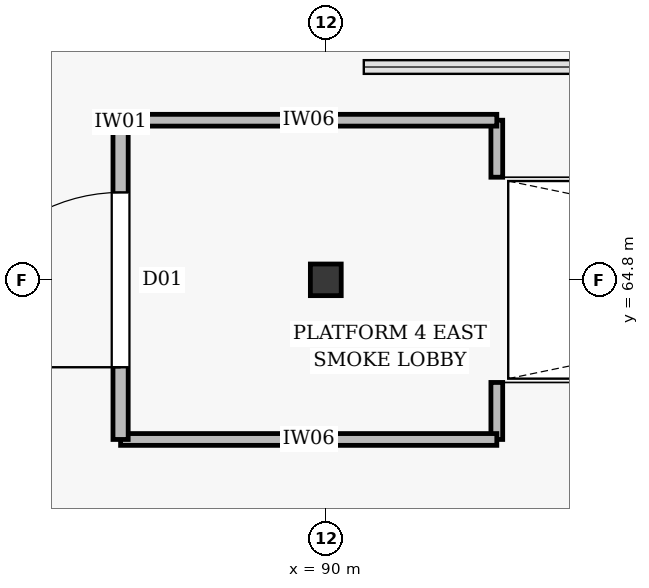
"""IFC4 building model, lengths in metres.
Left out: names, types, materials, properties, quantities, classifications, styles, units other than length and angle.
Written with IfcOpenShell. Run it as: python <this file> out.ifc"""

import sys

from ifc_helpers import new_model, si_unit, direction, frame, frame_2d, origin, origin_2d, place, context, subcontext, project, spatial, rectangle, i_section, extrude, element, fill, save


model = new_model("IFC4")
c1 = context("Model", 3, precision=1e-05, world=origin(), true_north=direction((0.0, 1.0)))
c2 = subcontext(c1, "Body", "Model", "MODEL_VIEW")
j1 = project(units=[si_unit("LENGTHUNIT", "METRE"), si_unit("PLANEANGLEUNIT", "RADIAN")], contexts=[c1])
p1 = place(None, origin())
s1 = spatial("IfcSite", under=j1, at=p1, CompositionType="ELEMENT")
p2 = place(p1, origin())
s2 = spatial("IfcBuilding", under=s1, at=p2, CompositionType="ELEMENT")
p3 = place(p2, frame((0.0, 0.0, 6.6)))
s3 = spatial("IfcBuildingStorey", under=s2, at=p3, CompositionType="ELEMENT", Elevation=6.6)
p4 = place(p3, frame((90.0, 64.8, 0.0), z_axis=(0.0, 0.0, 1.0), x_axis=(1.0, 0.0, 0.0)))
e1 = element("IfcColumn", 1, at=p4, inside=s3, PredefinedType="COLUMN", context=c2, shape_type="SweptSolid", body=[
    extrude(i_section(OverallWidth=0.406, OverallDepth=0.416, WebThickness=0.023, FlangeThickness=0.035, at=origin_2d()), origin(), (0.0, 0.0, 1.0), 6.0),
])
for number, where, z_axis, x_axis in (
    (2, (92.25, 62.7, 0.0), (0.0, 0.0, 1.0), (0.0, 1.0, 0.0)),
    (3, (92.25, 66.15, 0.0), (0.0, 0.0, 1.0), (0.0, 1.0, 0.0)),
):
    element("IfcWall", number, at=place(p3, frame(where, z_axis=z_axis, x_axis=x_axis)), inside=s3, PredefinedType="PARTITIONING", context=c2, shape_type="SweptSolid", body=[
        extrude(rectangle(XDim=0.75, YDim=0.155, at=frame_2d((0.375, 0.0))), origin(), (0.0, 0.0, 1.0), 2.62),
    ])
for number, where, z_axis, x_axis in (
    (4, (87.3, 62.7, 0.0), (0.0, 0.0, 1.0), (1.0, 0.0, 0.0)),
    (5, (87.3, 66.9, 0.0), (0.0, 0.0, 1.0), (1.0, 0.0, 0.0)),
):
    element("IfcWall", number, at=place(p3, frame(where, z_axis=z_axis, x_axis=x_axis)), inside=s3, PredefinedType="PARTITIONING", context=c2, shape_type="SweptSolid", body=[
        extrude(rectangle(XDim=4.95, YDim=0.155, at=frame_2d((2.475, 0.0))), origin(), (0.0, 0.0, 1.0), 2.62),
    ])
p5 = place(p3, frame((87.3, 62.7, 0.0), z_axis=(0.0, 0.0, 1.0), x_axis=(0.0, 1.0, 0.0)))
e6 = element("IfcWall", 6, at=p5, inside=s3, PredefinedType="PARTITIONING", context=c2, shape_type="SweptSolid", body=[
    extrude(rectangle(XDim=4.2, YDim=0.2, at=frame_2d((2.1, 0.0))), origin(), (0.0, 0.0, 1.0), 2.62),
])
p6 = place(p5, frame((0.95, 0.0, 0.005)))
e7 = element("IfcOpeningElement", 7, at=p6, cuts=e6, PredefinedType="OPENING", context=c2, shape_type="SweptSolid", body=[
    extrude(rectangle(XDim=2.3, YDim=2.4, at=frame_2d((1.15, 1.2))), frame((0.0, 0.112, 0.0), z_axis=(0.0, -1.0, 0.0), x_axis=(1.0, 0.0, 0.0)), (0.0, 0.0, 1.0), 0.224),
])
p7 = place(p6, origin())
e8 = element("IfcDoor", 8, at=p7, inside=s3, OperationType="DOUBLE_DOOR_SINGLE_SWING", PredefinedType="DOOR", context=c2, shape_type="SweptSolid", body=[
    extrude(rectangle(XDim=2.3, YDim=2.4, at=frame_2d((1.15, 1.2))), frame((0.0, 0.025, 0.0), z_axis=(0.0, -1.0, 0.0), x_axis=(1.0, 0.0, 0.0)), (0.0, 0.0, 1.0), 0.05),
])
fill(e7, e8)
save(model, sys.argv[1])
